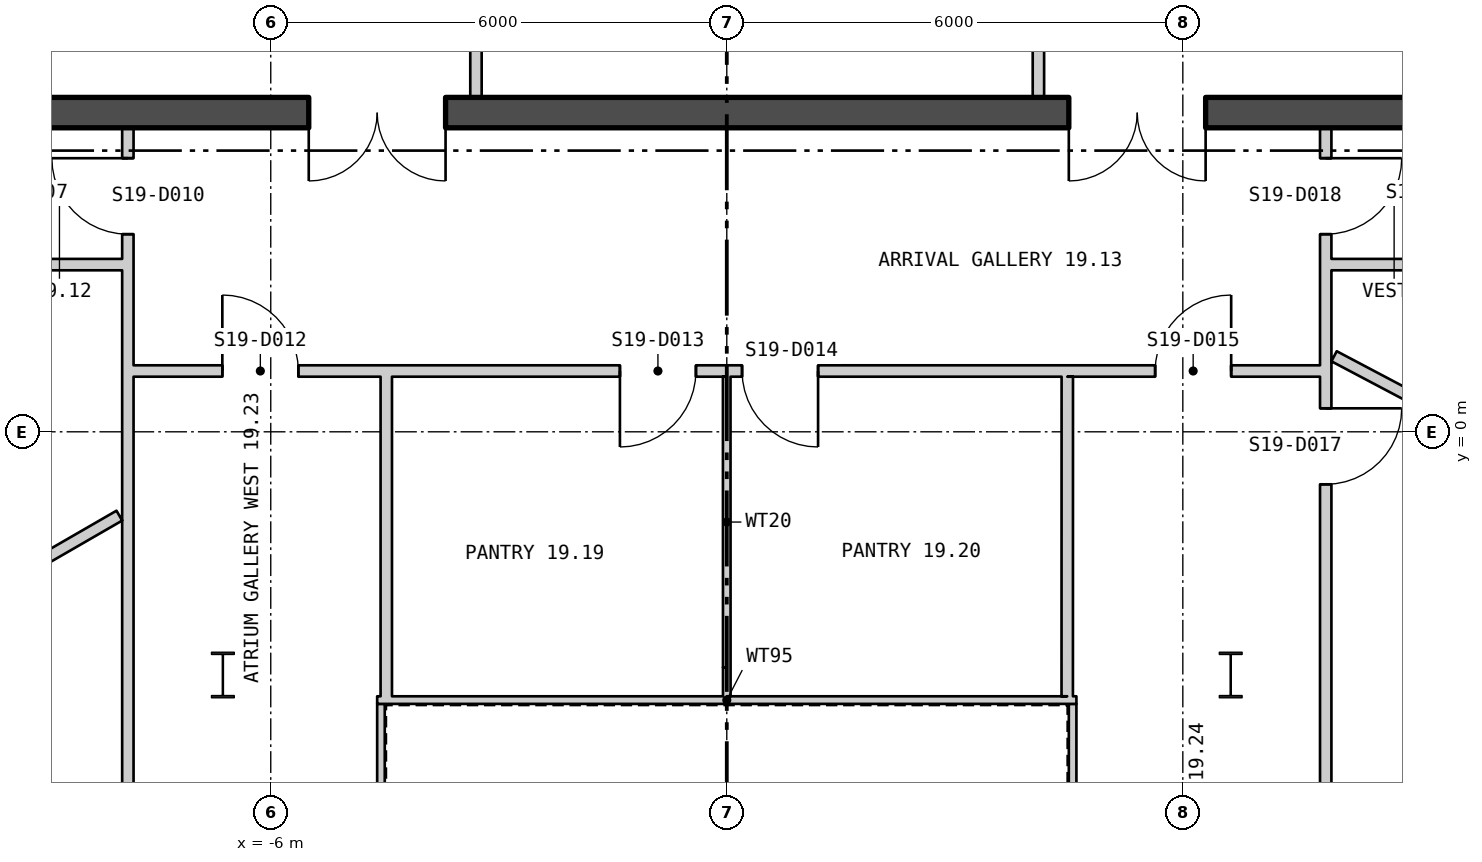
"""IFC4 building model, lengths in metres.
Left out: names, types, materials, properties, quantities, classifications, styles, units other than length and angle.
Written with IfcOpenShell. Run it as: python <this file> out.ifc"""

import sys

from ifc_helpers import new_model, si_unit, direction, frame, frame_2d, origin, origin_2d, place, context, subcontext, project, spatial, polyline, rectangle, i_section, outline, extrude, element, fill, save


model = new_model("IFC4")
c1 = context("Model", 3, precision=1e-05, world=origin(), true_north=direction((0.0, 1.0)))
c2 = subcontext(c1, "Body", "Model", "MODEL_VIEW")
j1 = project(units=[si_unit("LENGTHUNIT", "METRE"), si_unit("PLANEANGLEUNIT", "RADIAN")], contexts=[c1])
p1 = place(None, origin())
s1 = spatial("IfcSite", under=j1, at=p1, CompositionType="ELEMENT")
p2 = place(p1, origin())
s2 = spatial("IfcBuilding", under=s1, at=p2, CompositionType="ELEMENT")
p3 = place(p2, frame((0.0, 0.0, 257.1)))
s3 = spatial("IfcBuildingStorey", under=s2, at=p3, CompositionType="ELEMENT", Elevation=257.1)
for number, where, z_axis, x_axis in (
    (1, (6.63, -3.2, 0.0), (0.0, 0.0, 1.0), (1.0, 0.0, 0.0)),
    (2, (-6.63, -3.2, 0.0), (0.0, 0.0, 1.0), (1.0, 0.0, 0.0)),
):
    element("IfcColumn", number, at=place(p3, frame(where, z_axis=z_axis, x_axis=x_axis)), inside=s3, PredefinedType="COLUMN", context=c2, shape_type="SweptSolid", body=[
        extrude(i_section(OverallWidth=0.3, OverallDepth=0.6, WebThickness=0.015, FlangeThickness=0.03, at=origin_2d()), origin(), (0.0, 0.0, 1.0), 3.9),
    ])
p4 = place(p3, frame((-25.69, 15.082, -0.18), z_axis=(0.0, 0.0, 1.0), x_axis=(0.500000141277, -0.866025322218, 0.0)))
e3 = element("IfcWall", 3, at=p4, inside=s3, PredefinedType="SOLIDWALL", context=c2, shape_type="SweptSolid", body=[
    extrude(outline(polyline([(-0.13, -0.225), (45.86, -0.225), (45.6, 0.225), (0.13, 0.225), (-0.13, -0.225)])), origin(), (0.0, 0.0, 1.0), 3.68),
])
p5 = place(p4, frame((1.424, 0.0, 1.08)))
e4 = element("IfcOpeningElement", 4, at=p5, cuts=e3, PredefinedType="OPENING", context=c2, shape_type="SweptSolid", body=[
    extrude(rectangle(XDim=2.4, YDim=2.0, at=frame_2d((1.2, 1.0))), frame((0.0, 0.235, 0.0), z_axis=(0.0, -1.0, 0.0), x_axis=(1.0, 0.0, 0.0)), (0.0, 0.0, 1.0), 0.47),
])
p6 = place(p4, frame((5.892, 0.0, 1.08)))
e5 = element("IfcOpeningElement", 5, at=p6, cuts=e3, PredefinedType="OPENING", context=c2, shape_type="SweptSolid", body=[
    extrude(rectangle(XDim=2.4, YDim=2.0, at=frame_2d((1.2, 1.0))), frame((0.0, 0.235, 0.0), z_axis=(0.0, -1.0, 0.0), x_axis=(1.0, 0.0, 0.0)), (0.0, 0.0, 1.0), 0.47),
])
p7 = place(p4, frame((10.399, 0.0, 1.08)))
e6 = element("IfcOpeningElement", 6, at=p7, cuts=e3, PredefinedType="OPENING", context=c2, shape_type="SweptSolid", body=[
    extrude(rectangle(XDim=2.4, YDim=2.0, at=frame_2d((1.2, 1.0))), frame((0.0, 0.235, 0.0), z_axis=(0.0, -1.0, 0.0), x_axis=(1.0, 0.0, 0.0)), (0.0, 0.0, 1.0), 0.47),
])
p8 = place(p4, frame((14.905, 0.0, 1.08)))
e7 = element("IfcOpeningElement", 7, at=p8, cuts=e3, PredefinedType="OPENING", context=c2, shape_type="SweptSolid", body=[
    extrude(rectangle(XDim=2.4, YDim=2.0, at=frame_2d((1.2, 1.0))), frame((0.0, 0.235, 0.0), z_axis=(0.0, -1.0, 0.0), x_axis=(1.0, 0.0, 0.0)), (0.0, 0.0, 1.0), 0.47),
])
p9 = place(p4, frame((19.412, 0.0, 1.08)))
e8 = element("IfcOpeningElement", 8, at=p9, cuts=e3, PredefinedType="OPENING", context=c2, shape_type="SweptSolid", body=[
    extrude(rectangle(XDim=2.4, YDim=2.0, at=frame_2d((1.2, 1.0))), frame((0.0, 0.235, 0.0), z_axis=(0.0, -1.0, 0.0), x_axis=(1.0, 0.0, 0.0)), (0.0, 0.0, 1.0), 0.47),
])
p10 = place(p4, frame((23.918, 0.0, 1.08)))
e9 = element("IfcOpeningElement", 9, at=p10, cuts=e3, PredefinedType="OPENING", context=c2, shape_type="SweptSolid", body=[
    extrude(rectangle(XDim=2.4, YDim=2.0, at=frame_2d((1.2, 1.0))), frame((0.0, 0.235, 0.0), z_axis=(0.0, -1.0, 0.0), x_axis=(1.0, 0.0, 0.0)), (0.0, 0.0, 1.0), 0.47),
])
p11 = place(p4, frame((28.425, 0.0, 1.08)))
e10 = element("IfcOpeningElement", 10, at=p11, cuts=e3, PredefinedType="OPENING", context=c2, shape_type="SweptSolid", body=[
    extrude(rectangle(XDim=2.4, YDim=2.0, at=frame_2d((1.2, 1.0))), frame((0.0, 0.235, 0.0), z_axis=(0.0, -1.0, 0.0), x_axis=(1.0, 0.0, 0.0)), (0.0, 0.0, 1.0), 0.47),
])
p12 = place(p4, frame((32.932, 0.0, 1.08)))
e11 = element("IfcOpeningElement", 11, at=p12, cuts=e3, PredefinedType="OPENING", context=c2, shape_type="SweptSolid", body=[
    extrude(rectangle(XDim=2.4, YDim=2.0, at=frame_2d((1.2, 1.0))), frame((0.0, 0.235, 0.0), z_axis=(0.0, -1.0, 0.0), x_axis=(1.0, 0.0, 0.0)), (0.0, 0.0, 1.0), 0.47),
])
p13 = place(p4, frame((37.438, 0.0, 1.08)))
e12 = element("IfcOpeningElement", 12, at=p13, cuts=e3, PredefinedType="OPENING", context=c2, shape_type="SweptSolid", body=[
    extrude(rectangle(XDim=2.4, YDim=2.0, at=frame_2d((1.2, 1.0))), frame((0.0, 0.235, 0.0), z_axis=(0.0, -1.0, 0.0), x_axis=(1.0, 0.0, 0.0)), (0.0, 0.0, 1.0), 0.47),
])
p14 = place(p4, frame((41.907, 0.0, 1.08)))
e13 = element("IfcOpeningElement", 13, at=p14, cuts=e3, PredefinedType="OPENING", context=c2, shape_type="SweptSolid", body=[
    extrude(rectangle(XDim=2.4, YDim=2.0, at=frame_2d((1.2, 1.0))), frame((0.0, 0.235, 0.0), z_axis=(0.0, -1.0, 0.0), x_axis=(1.0, 0.0, 0.0)), (0.0, 0.0, 1.0), 0.47),
])
p15 = place(p3, frame((2.825, -24.522, -0.18), z_axis=(0.0, 0.0, 1.0), x_axis=(0.500000141277, 0.866025322218, 0.0)))
e14 = element("IfcWall", 14, at=p15, inside=s3, PredefinedType="SOLIDWALL", context=c2, shape_type="SweptSolid", body=[
    extrude(outline(polyline([(-0.13, -0.225), (45.86, -0.225), (45.6, 0.225), (0.13, 0.225), (-0.13, -0.225)])), origin(), (0.0, 0.0, 1.0), 3.68),
])
p16 = place(p15, frame((1.424, 0.0, 1.08)))
e15 = element("IfcOpeningElement", 15, at=p16, cuts=e14, PredefinedType="OPENING", context=c2, shape_type="SweptSolid", body=[
    extrude(rectangle(XDim=2.4, YDim=2.0, at=frame_2d((1.2, 1.0))), frame((0.0, 0.235, 0.0), z_axis=(0.0, -1.0, 0.0), x_axis=(1.0, 0.0, 0.0)), (0.0, 0.0, 1.0), 0.47),
])
p17 = place(p15, frame((5.892, 0.0, 1.08)))
e16 = element("IfcOpeningElement", 16, at=p17, cuts=e14, PredefinedType="OPENING", context=c2, shape_type="SweptSolid", body=[
    extrude(rectangle(XDim=2.4, YDim=2.0, at=frame_2d((1.2, 1.0))), frame((0.0, 0.235, 0.0), z_axis=(0.0, -1.0, 0.0), x_axis=(1.0, 0.0, 0.0)), (0.0, 0.0, 1.0), 0.47),
])
p18 = place(p15, frame((10.399, 0.0, 1.08)))
e17 = element("IfcOpeningElement", 17, at=p18, cuts=e14, PredefinedType="OPENING", context=c2, shape_type="SweptSolid", body=[
    extrude(rectangle(XDim=2.4, YDim=2.0, at=frame_2d((1.2, 1.0))), frame((0.0, 0.235, 0.0), z_axis=(0.0, -1.0, 0.0), x_axis=(1.0, 0.0, 0.0)), (0.0, 0.0, 1.0), 0.47),
])
p19 = place(p15, frame((14.905, 0.0, 1.08)))
e18 = element("IfcOpeningElement", 18, at=p19, cuts=e14, PredefinedType="OPENING", context=c2, shape_type="SweptSolid", body=[
    extrude(rectangle(XDim=2.4, YDim=2.0, at=frame_2d((1.2, 1.0))), frame((0.0, 0.235, 0.0), z_axis=(0.0, -1.0, 0.0), x_axis=(1.0, 0.0, 0.0)), (0.0, 0.0, 1.0), 0.47),
])
p20 = place(p15, frame((19.412, 0.0, 1.08)))
e19 = element("IfcOpeningElement", 19, at=p20, cuts=e14, PredefinedType="OPENING", context=c2, shape_type="SweptSolid", body=[
    extrude(rectangle(XDim=2.4, YDim=2.0, at=frame_2d((1.2, 1.0))), frame((0.0, 0.235, 0.0), z_axis=(0.0, -1.0, 0.0), x_axis=(1.0, 0.0, 0.0)), (0.0, 0.0, 1.0), 0.47),
])
p21 = place(p15, frame((28.425, 0.0, 1.08)))
e20 = element("IfcOpeningElement", 20, at=p21, cuts=e14, PredefinedType="OPENING", context=c2, shape_type="SweptSolid", body=[
    extrude(rectangle(XDim=2.4, YDim=2.0, at=frame_2d((1.2, 1.0))), frame((0.0, 0.235, 0.0), z_axis=(0.0, -1.0, 0.0), x_axis=(1.0, 0.0, 0.0)), (0.0, 0.0, 1.0), 0.47),
])
p22 = place(p15, frame((37.438, 0.0, 1.08)))
e21 = element("IfcOpeningElement", 21, at=p22, cuts=e14, PredefinedType="OPENING", context=c2, shape_type="SweptSolid", body=[
    extrude(rectangle(XDim=2.4, YDim=2.0, at=frame_2d((1.2, 1.0))), frame((0.0, 0.235, 0.0), z_axis=(0.0, -1.0, 0.0), x_axis=(1.0, 0.0, 0.0)), (0.0, 0.0, 1.0), 0.47),
])
p23 = place(p15, frame((41.907, 0.0, 1.08)))
e22 = element("IfcOpeningElement", 22, at=p23, cuts=e14, PredefinedType="OPENING", context=c2, shape_type="SweptSolid", body=[
    extrude(rectangle(XDim=2.4, YDim=2.0, at=frame_2d((1.2, 1.0))), frame((0.0, 0.235, 0.0), z_axis=(0.0, -1.0, 0.0), x_axis=(1.0, 0.0, 0.0)), (0.0, 0.0, 1.0), 0.47),
])
p24 = place(p3, frame((4.55, -11.62, 0.0), z_axis=(0.0, 0.0, 1.0), x_axis=(0.0, 1.0, 0.0)))
e23 = element("IfcWall", 23, at=p24, inside=s3, PredefinedType="PARTITIONING", context=c2, shape_type="SweptSolid", body=[
    extrude(rectangle(XDim=8.04, YDim=0.1, at=frame_2d((4.02, 0.0))), origin(), (0.0, 0.0, 1.0), 3.7),
])
p25 = place(p3, frame((4.6, -3.53, 0.0), z_axis=(0.0, 0.0, 1.0), x_axis=(-1.0, 0.0, 0.0)))
e24 = element("IfcWall", 24, at=p25, inside=s3, PredefinedType="PARTITIONING", context=c2, shape_type="SweptSolid", body=[
    extrude(rectangle(XDim=9.2, YDim=0.1, at=frame_2d((4.6, 0.0))), origin(), (0.0, 0.0, 1.0), 3.7),
])
p26 = place(p3, frame((-4.55, -3.58, 0.0), z_axis=(0.0, 0.0, 1.0), x_axis=(0.0, -1.0, 0.0)))
e25 = element("IfcWall", 25, at=p26, inside=s3, PredefinedType="PARTITIONING", context=c2, shape_type="SweptSolid", body=[
    extrude(rectangle(XDim=8.04, YDim=0.1, at=frame_2d((4.02, 0.0))), origin(), (0.0, 0.0, 1.0), 3.7),
])
p27 = place(p3, frame((-14.5, 4.2, 0.0), z_axis=(0.0, 0.0, 1.0), x_axis=(1.0, 0.0, 0.0)))
e26 = element("IfcWall", 26, at=p27, inside=s3, PredefinedType="SHEAR", context=c2, shape_type="SweptSolid", body=[
    extrude(rectangle(XDim=29.0, YDim=0.4, at=frame_2d((14.5, 0.0))), origin(), (0.0, 0.0, 1.0), 3.7),
])
p28 = place(p27, frame((9.0, 0.0, 0.0)))
e27 = element("IfcOpeningElement", 27, at=p28, cuts=e26, PredefinedType="OPENING", context=c2, shape_type="SweptSolid", body=[
    extrude(rectangle(XDim=1.8, YDim=2.4, at=frame_2d((0.9, 1.2))), frame((0.0, 0.21, 0.0), z_axis=(0.0, -1.0, 0.0), x_axis=(1.0, 0.0, 0.0)), (0.0, 0.0, 1.0), 0.42),
])
p29 = place(p27, frame((19.0, 0.0, 0.0)))
e28 = element("IfcOpeningElement", 28, at=p29, cuts=e26, PredefinedType="OPENING", context=c2, shape_type="SweptSolid", body=[
    extrude(rectangle(XDim=1.8, YDim=2.4, at=frame_2d((0.9, 1.2))), frame((0.0, 0.21, 0.0), z_axis=(0.0, -1.0, 0.0), x_axis=(1.0, 0.0, 0.0)), (0.0, 0.0, 1.0), 0.42),
])
for number, where, z_axis, x_axis in (
    (29, (-3.3, 4.4, 0.0), (0.0, 0.0, 1.0), (0.0, 1.0, 0.0)),
    (30, (4.1, 4.4, 0.0), (0.0, 0.0, 1.0), (0.0, 1.0, 0.0)),
):
    element("IfcWall", number, at=place(p3, frame(where, z_axis=z_axis, x_axis=x_axis)), inside=s3, PredefinedType="PARTITIONING", context=c2, shape_type="SweptSolid", body=[
        extrude(rectangle(XDim=1.895, YDim=0.15, at=frame_2d((0.948, 0.0))), origin(), (0.0, 0.0, 1.0), 3.7),
    ])
p30 = place(p3, frame((-16.225, 2.2, 0.0), z_axis=(0.0, 0.0, 1.0), x_axis=(1.0, 0.0, 0.0)))
e31 = element("IfcWall", 31, at=p30, inside=s3, PredefinedType="PARTITIONING", context=c2, shape_type="SweptSolid", body=[
    extrude(rectangle(XDim=8.27, YDim=0.15, at=frame_2d((4.135, 0.0))), origin(), (0.0, 0.0, 1.0), 3.7),
])
p31 = place(p30, frame((3.584, 0.0, 0.0)))
e32 = element("IfcOpeningElement", 32, at=p31, cuts=e31, PredefinedType="OPENING", context=c2, shape_type="SweptSolid", body=[
    extrude(rectangle(XDim=1.0, YDim=2.1, at=frame_2d((0.5, 1.05))), frame((0.0, 0.085, 0.0), z_axis=(0.0, -1.0, 0.0), x_axis=(1.0, 0.0, 0.0)), (0.0, 0.0, 1.0), 0.17),
])
p32 = place(p3, frame((-13.673, -4.382, 0.0), z_axis=(0.0, 0.0, 1.0), x_axis=(0.866086584464, 0.499894016979, 0.0)))
e33 = element("IfcWall", 33, at=p32, inside=s3, PredefinedType="PARTITIONING", context=c2, shape_type="SweptSolid", body=[
    extrude(rectangle(XDim=6.559, YDim=0.15, at=frame_2d((3.28, 0.0))), origin(), (0.0, 0.0, 1.0), 3.7),
])
p33 = place(p3, frame((-7.88, -13.675, 0.0), z_axis=(0.0, 0.0, 1.0), x_axis=(0.0, 1.0, 0.0)))
e34 = element("IfcWall", 34, at=p33, inside=s3, PredefinedType="PARTITIONING", context=c2, shape_type="SweptSolid", body=[
    extrude(rectangle(XDim=17.675, YDim=0.15, at=frame_2d((8.838, 0.0))), origin(), (0.0, 0.0, 1.0), 3.7),
])
p34 = place(p33, frame((4.331, 0.0, 0.0)))
e35 = element("IfcOpeningElement", 35, at=p34, cuts=e34, PredefinedType="OPENING", context=c2, shape_type="SweptSolid", body=[
    extrude(rectangle(XDim=1.0, YDim=2.1, at=frame_2d((0.5, 1.05))), frame((0.0, 0.085, 0.0), z_axis=(0.0, -1.0, 0.0), x_axis=(1.0, 0.0, 0.0)), (0.0, 0.0, 1.0), 0.17),
])
p35 = place(p33, frame((7.633, 0.0, 0.0)))
e36 = element("IfcOpeningElement", 36, at=p35, cuts=e34, PredefinedType="OPENING", context=c2, shape_type="SweptSolid", body=[
    extrude(rectangle(XDim=1.0, YDim=2.1, at=frame_2d((0.5, 1.05))), frame((0.0, 0.085, 0.0), z_axis=(0.0, -1.0, 0.0), x_axis=(1.0, 0.0, 0.0)), (0.0, 0.0, 1.0), 0.17),
])
p36 = place(p33, frame((16.275, 0.0, 0.0)))
e37 = element("IfcOpeningElement", 37, at=p36, cuts=e34, PredefinedType="OPENING", context=c2, shape_type="SweptSolid", body=[
    extrude(rectangle(XDim=1.0, YDim=2.1, at=frame_2d((0.5, 1.05))), frame((0.0, 0.085, 0.0), z_axis=(0.0, -1.0, 0.0), x_axis=(1.0, 0.0, 0.0)), (0.0, 0.0, 1.0), 0.17),
])
p37 = place(p3, frame((-7.805, 0.8, 0.0), z_axis=(0.0, 0.0, 1.0), x_axis=(1.0, 0.0, 0.0)))
e38 = element("IfcWall", 38, at=p37, inside=s3, PredefinedType="PARTITIONING", context=c2, shape_type="SweptSolid", body=[
    extrude(rectangle(XDim=15.61, YDim=0.15, at=frame_2d((7.805, 0.0))), origin(), (0.0, 0.0, 1.0), 3.7),
])
p38 = place(p37, frame((1.168, 0.0, 0.0)))
e39 = element("IfcOpeningElement", 39, at=p38, cuts=e38, PredefinedType="OPENING", context=c2, shape_type="SweptSolid", body=[
    extrude(rectangle(XDim=1.0, YDim=2.1, at=frame_2d((0.5, 1.05))), frame((0.0, 0.085, 0.0), z_axis=(0.0, -1.0, 0.0), x_axis=(1.0, 0.0, 0.0)), (0.0, 0.0, 1.0), 0.17),
])
p39 = place(p37, frame((6.399, 0.0, 0.0)))
e40 = element("IfcOpeningElement", 40, at=p39, cuts=e38, PredefinedType="OPENING", context=c2, shape_type="SweptSolid", body=[
    extrude(rectangle(XDim=1.0, YDim=2.1, at=frame_2d((0.5, 1.05))), frame((0.0, 0.085, 0.0), z_axis=(0.0, -1.0, 0.0), x_axis=(1.0, 0.0, 0.0)), (0.0, 0.0, 1.0), 0.17),
])
p40 = place(p37, frame((8.006, 0.0, 0.0)))
e41 = element("IfcOpeningElement", 41, at=p40, cuts=e38, PredefinedType="OPENING", context=c2, shape_type="SweptSolid", body=[
    extrude(rectangle(XDim=1.0, YDim=2.1, at=frame_2d((0.5, 1.05))), frame((0.0, 0.085, 0.0), z_axis=(0.0, -1.0, 0.0), x_axis=(1.0, 0.0, 0.0)), (0.0, 0.0, 1.0), 0.17),
])
p41 = place(p37, frame((13.441, 0.0, 0.0)))
e42 = element("IfcOpeningElement", 42, at=p41, cuts=e38, PredefinedType="OPENING", context=c2, shape_type="SweptSolid", body=[
    extrude(rectangle(XDim=1.0, YDim=2.1, at=frame_2d((0.5, 1.05))), frame((0.0, 0.085, 0.0), z_axis=(0.0, -1.0, 0.0), x_axis=(1.0, 0.0, 0.0)), (0.0, 0.0, 1.0), 0.17),
])
p42 = place(p3, frame((-4.48, -3.48, 0.0), z_axis=(0.0, 0.0, 1.0), x_axis=(0.0, 1.0, 0.0)))
e43 = element("IfcWall", 43, at=p42, inside=s3, PredefinedType="PARTITIONING", context=c2, shape_type="SweptSolid", body=[
    extrude(rectangle(XDim=4.205, YDim=0.15, at=frame_2d((2.103, 0.0))), origin(), (0.0, 0.0, 1.0), 3.7),
])
p43 = place(p3, frame((-0.001, 0.725, 0.0), z_axis=(0.0, 0.0, 1.0), x_axis=(0.000235294111, -0.999999972318, 0.0)))
e44 = element("IfcWall", 44, at=p43, inside=s3, PredefinedType="PARTITIONING", context=c2, shape_type="SweptSolid", body=[
    extrude(rectangle(XDim=3.825, YDim=0.1, at=frame_2d((1.913, 0.0))), origin(), (0.0, 0.0, 1.0), 3.2),
])
p44 = place(p3, frame((-0.0, -3.1, 0.0), z_axis=(0.0, 0.0, 1.0), x_axis=(0.000263157886, -0.999999965374, 0.0)))
e45 = element("IfcWall", 45, at=p44, inside=s3, PredefinedType="PARTITIONING", context=c2, shape_type="SweptSolid", body=[
    extrude(rectangle(XDim=0.38, YDim=0.1, at=frame_2d((0.19, 0.0))), origin(), (0.0, 0.0, 1.0), 3.7),
])
p45 = place(p3, frame((4.479, -3.48, 0.0), z_axis=(0.0, 0.0, 1.0), x_axis=(0.000237812122, 0.999999971723, 0.0)))
e46 = element("IfcWall", 46, at=p45, inside=s3, PredefinedType="PARTITIONING", context=c2, shape_type="SweptSolid", body=[
    extrude(rectangle(XDim=4.205, YDim=0.15, at=frame_2d((2.103, 0.0))), origin(), (0.0, 0.0, 1.0), 3.7),
])
p46 = place(p3, frame((7.88, -13.675, 0.0), z_axis=(0.0, 0.0, 1.0), x_axis=(0.0, 1.0, 0.0)))
e47 = element("IfcWall", 47, at=p46, inside=s3, PredefinedType="PARTITIONING", context=c2, shape_type="SweptSolid", body=[
    extrude(rectangle(XDim=17.675, YDim=0.15, at=frame_2d((8.838, 0.0))), origin(), (0.0, 0.0, 1.0), 3.7),
])
p47 = place(p46, frame((12.984, 0.0, 0.0)))
e48 = element("IfcOpeningElement", 48, at=p47, cuts=e47, PredefinedType="OPENING", context=c2, shape_type="SweptSolid", body=[
    extrude(rectangle(XDim=1.0, YDim=2.1, at=frame_2d((0.5, 1.05))), frame((0.0, 0.085, 0.0), z_axis=(0.0, -1.0, 0.0), x_axis=(1.0, 0.0, 0.0)), (0.0, 0.0, 1.0), 0.17),
])
p48 = place(p46, frame((16.275, 0.0, 0.0)))
e49 = element("IfcOpeningElement", 49, at=p48, cuts=e47, PredefinedType="OPENING", context=c2, shape_type="SweptSolid", body=[
    extrude(rectangle(XDim=1.0, YDim=2.1, at=frame_2d((0.5, 1.05))), frame((0.0, 0.085, 0.0), z_axis=(0.0, -1.0, 0.0), x_axis=(1.0, 0.0, 0.0)), (0.0, 0.0, 1.0), 0.17),
])
p49 = place(p3, frame((7.955, 2.2, 0.0), z_axis=(0.0, 0.0, 1.0), x_axis=(1.0, 0.0, 0.0)))
e50 = element("IfcWall", 50, at=p49, inside=s3, PredefinedType="PARTITIONING", context=c2, shape_type="SweptSolid", body=[
    extrude(rectangle(XDim=8.27, YDim=0.15, at=frame_2d((4.135, 0.0))), origin(), (0.0, 0.0, 1.0), 3.7),
])
p50 = place(p3, frame((7.99, 0.994, 0.0), z_axis=(0.0, 0.0, 1.0), x_axis=(0.88420981039, -0.467089939102, 0.0)))
e51 = element("IfcWall", 51, at=p50, inside=s3, PredefinedType="PARTITIONING", context=c2, shape_type="SweptSolid", body=[
    extrude(rectangle(XDim=8.065, YDim=0.15, at=frame_2d((4.032, 0.0))), origin(), (0.0, 0.0, 1.0), 3.7),
])
p51 = place(p28, origin())
e52 = element("IfcDoor", 52, at=p51, inside=s3, OperationType="DOUBLE_DOOR_SINGLE_SWING", PredefinedType="DOOR", context=c2, shape_type="SweptSolid", body=[
    extrude(rectangle(XDim=1.8, YDim=2.4, at=frame_2d((0.9, 1.2))), frame((0.0, 0.025, 0.0), z_axis=(0.0, -1.0, 0.0), x_axis=(1.0, 0.0, 0.0)), (0.0, 0.0, 1.0), 0.05),
])
fill(e27, e52)
p52 = place(p29, origin())
e53 = element("IfcDoor", 53, at=p52, inside=s3, OperationType="DOUBLE_DOOR_SINGLE_SWING", PredefinedType="DOOR", context=c2, shape_type="SweptSolid", body=[
    extrude(rectangle(XDim=1.8, YDim=2.4, at=frame_2d((0.9, 1.2))), frame((0.0, 0.025, 0.0), z_axis=(0.0, -1.0, 0.0), x_axis=(1.0, 0.0, 0.0)), (0.0, 0.0, 1.0), 0.05),
])
fill(e28, e53)
p53 = place(p36, origin())
e54 = element("IfcDoor", 54, at=p53, inside=s3, OperationType="SINGLE_SWING_LEFT", PredefinedType="DOOR", context=c2, shape_type="SweptSolid", body=[
    extrude(rectangle(XDim=1.0, YDim=2.1, at=frame_2d((0.5, 1.05))), frame((0.0, 0.025, 0.0), z_axis=(0.0, -1.0, 0.0), x_axis=(1.0, 0.0, 0.0)), (0.0, 0.0, 1.0), 0.05),
])
fill(e37, e54)
p54 = place(p38, origin())
e55 = element("IfcDoor", 55, at=p54, inside=s3, OperationType="SINGLE_SWING_RIGHT", PredefinedType="DOOR", context=c2, shape_type="SweptSolid", body=[
    extrude(rectangle(XDim=1.0, YDim=2.1, at=frame_2d((0.5, 1.05))), frame((0.0, 0.025, 0.0), z_axis=(0.0, -1.0, 0.0), x_axis=(1.0, 0.0, 0.0)), (0.0, 0.0, 1.0), 0.05),
])
fill(e39, e55)
p55 = place(p39, origin())
e56 = element("IfcDoor", 56, at=p55, inside=s3, OperationType="SINGLE_SWING_LEFT", PredefinedType="DOOR", context=c2, shape_type="SweptSolid", body=[
    extrude(rectangle(XDim=1.0, YDim=2.1, at=frame_2d((0.5, 1.05))), frame((0.0, 0.025, 0.0), z_axis=(0.0, -1.0, 0.0), x_axis=(1.0, 0.0, 0.0)), (0.0, 0.0, 1.0), 0.05),
])
fill(e40, e56)
p56 = place(p40, origin())
e57 = element("IfcDoor", 57, at=p56, inside=s3, OperationType="SINGLE_SWING_RIGHT", PredefinedType="DOOR", context=c2, shape_type="SweptSolid", body=[
    extrude(rectangle(XDim=1.0, YDim=2.1, at=frame_2d((0.5, 1.05))), frame((0.0, 0.025, 0.0), z_axis=(0.0, -1.0, 0.0), x_axis=(1.0, 0.0, 0.0)), (0.0, 0.0, 1.0), 0.05),
])
fill(e41, e57)
p57 = place(p41, origin())
e58 = element("IfcDoor", 58, at=p57, inside=s3, OperationType="SINGLE_SWING_LEFT", PredefinedType="DOOR", context=c2, shape_type="SweptSolid", body=[
    extrude(rectangle(XDim=1.0, YDim=2.1, at=frame_2d((0.5, 1.05))), frame((0.0, 0.025, 0.0), z_axis=(0.0, -1.0, 0.0), x_axis=(1.0, 0.0, 0.0)), (0.0, 0.0, 1.0), 0.05),
])
fill(e42, e58)
p58 = place(p47, origin())
e59 = element("IfcDoor", 59, at=p58, inside=s3, OperationType="SINGLE_SWING_RIGHT", PredefinedType="DOOR", context=c2, shape_type="SweptSolid", body=[
    extrude(rectangle(XDim=1.0, YDim=2.1, at=frame_2d((0.5, 1.05))), frame((0.0, 0.025, 0.0), z_axis=(0.0, -1.0, 0.0), x_axis=(1.0, 0.0, 0.0)), (0.0, 0.0, 1.0), 0.05),
])
fill(e48, e59)
p59 = place(p48, origin())
e60 = element("IfcDoor", 60, at=p59, inside=s3, OperationType="SINGLE_SWING_RIGHT", PredefinedType="DOOR", context=c2, shape_type="SweptSolid", body=[
    extrude(rectangle(XDim=1.0, YDim=2.1, at=frame_2d((0.5, 1.05))), frame((0.0, 0.025, 0.0), z_axis=(0.0, -1.0, 0.0), x_axis=(1.0, 0.0, 0.0)), (0.0, 0.0, 1.0), 0.05),
])
fill(e49, e60)
save(model, sys.argv[1])
